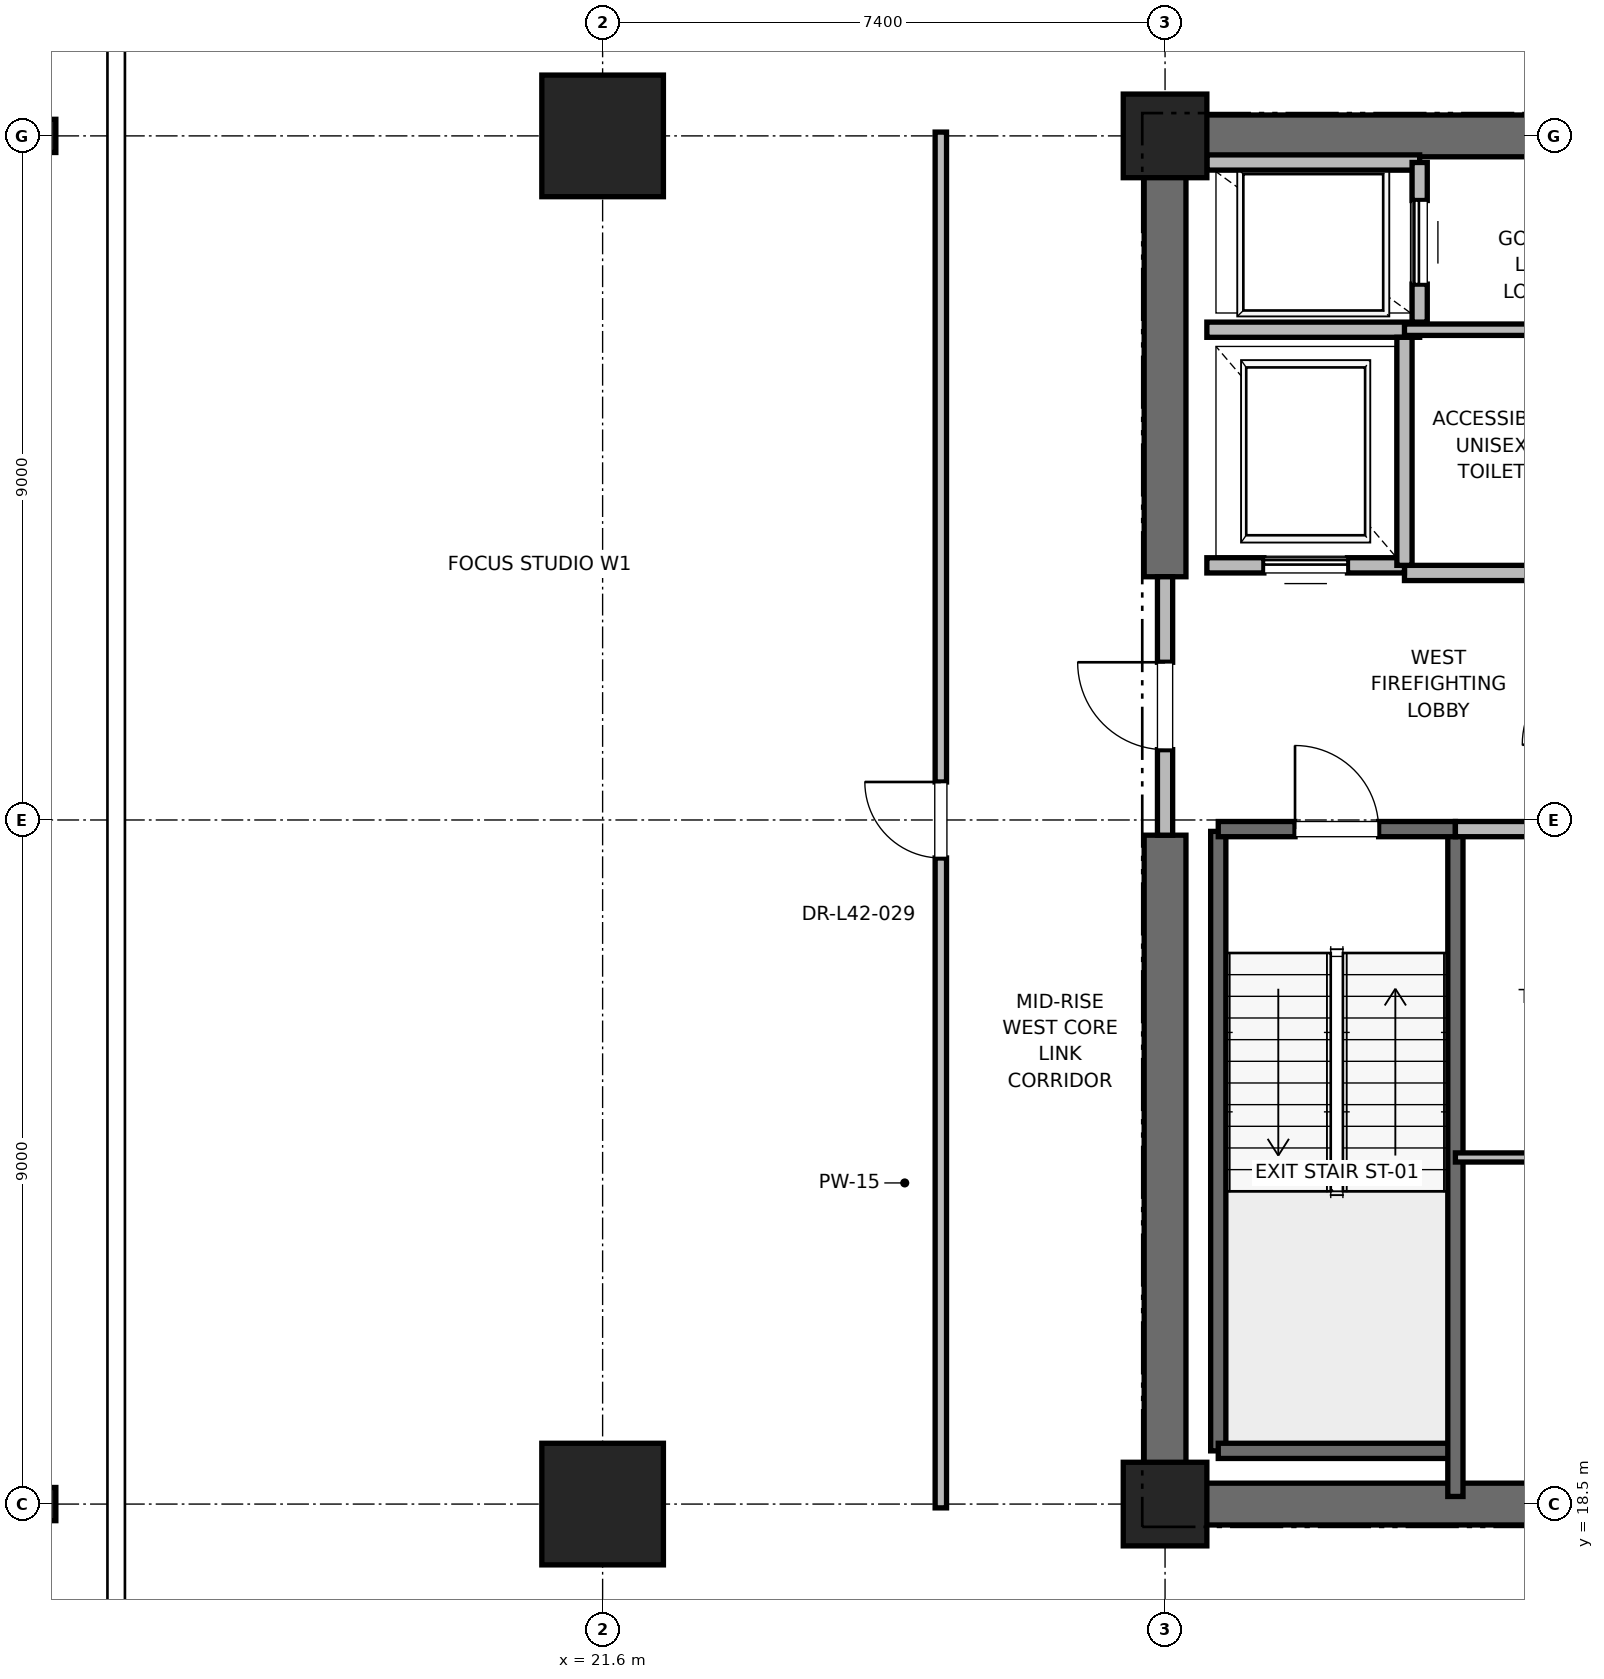
"""IFC4 building model, lengths in metres.
Left out: names, types, materials, properties, quantities, classifications, styles, units other than length and angle.
Written with IfcOpenShell. Run it as: python <this file> out.ifc"""

import sys

from ifc_helpers import new_model, si_unit, direction, frame, frame_2d, origin, origin_2d, place, context, subcontext, project, spatial, rectangle, i_section, extrude, element, fill, save


model = new_model("IFC4")
c1 = context("Model", 3, precision=1e-05, world=origin(), true_north=direction((0.0, 1.0)))
c2 = subcontext(c1, "Body", "Model", "MODEL_VIEW")
j1 = project(units=[si_unit("LENGTHUNIT", "METRE"), si_unit("PLANEANGLEUNIT", "RADIAN")], contexts=[c1])
p1 = place(None, origin())
s1 = spatial("IfcSite", under=j1, at=p1, CompositionType="ELEMENT")
p2 = place(p1, origin())
s2 = spatial("IfcBuilding", under=s1, at=p2, CompositionType="ELEMENT")
p3 = place(p2, frame((0.0, 0.0, 180.4)))
s3 = spatial("IfcBuildingStorey", under=s2, at=p3, CompositionType="ELEMENT", Elevation=180.4)
for number, where, z_axis, x_axis in (
    (1, (21.6, 18.5, 0.0), (0.0, 0.0, 1.0), (1.0, 0.0, 0.0)),
    (2, (21.6, 36.5, 0.0), (0.0, 0.0, 1.0), (1.0, 0.0, 0.0)),
):
    element("IfcColumn", number, at=place(p3, frame(where, z_axis=z_axis, x_axis=x_axis)), inside=s3, PredefinedType="COLUMN", context=c2, shape_type="SweptSolid", body=[
        extrude(rectangle(XDim=1.6, YDim=1.6, at=origin_2d()), origin(), (0.0, 0.0, 1.0), 4.0),
    ])
for number, where, z_axis, x_axis in (
    (3, (14.2, 18.5, 0.0), (0.0, 0.0, 1.0), (1.0, 0.0, 0.0)),
    (4, (14.2, 36.5, 0.0), (0.0, 0.0, 1.0), (1.0, 0.0, 0.0)),
):
    element("IfcColumn", number, at=place(p3, frame(where, z_axis=z_axis, x_axis=x_axis)), inside=s3, PredefinedType="COLUMN", context=c2, shape_type="SweptSolid", body=[
        extrude(i_section(OverallWidth=0.412, OverallDepth=0.437, WebThickness=0.036, FlangeThickness=0.058, FilletRadius=0.015, at=origin_2d()), origin(), (0.0, 0.0, 1.0), 4.0),
    ])
for number, where, z_axis, x_axis in (
    (5, (29.0, 18.5, 0.0), (0.0, 0.0, 1.0), (1.0, 0.0, 0.0)),
    (6, (29.0, 36.5, 0.0), (0.0, 0.0, 1.0), (1.0, 0.0, 0.0)),
):
    element("IfcColumn", number, at=place(p3, frame(where, z_axis=z_axis, x_axis=x_axis)), inside=s3, PredefinedType="PILASTER", context=c2, shape_type="SweptSolid", body=[
        extrude(rectangle(XDim=1.1, YDim=1.1, at=origin_2d()), origin(), (0.0, 0.0, 1.0), 4.0),
    ])
p4 = place(p3, frame((29.0, 18.5, 0.0), z_axis=(0.0, 0.0, 1.0), x_axis=(1.0, 0.0, 0.0)))
e7 = element("IfcWall", 7, at=p4, inside=s3, PredefinedType="SHEAR", context=c2, shape_type="SweptSolid", body=[
    extrude(rectangle(XDim=9.2, YDim=0.55, at=frame_2d((4.6, 0.0))), origin(), (0.0, 0.0, 1.0), 3.7),
])
p5 = place(p3, frame((29.0, 36.5, 0.0), z_axis=(0.0, 0.0, 1.0), x_axis=(1.0, 0.0, 0.0)))
e8 = element("IfcWall", 8, at=p5, inside=s3, PredefinedType="SHEAR", context=c2, shape_type="SweptSolid", body=[
    extrude(rectangle(XDim=5.8, YDim=0.55, at=frame_2d((2.9, 0.0))), origin(), (0.0, 0.0, 1.0), 3.7),
])
p6 = place(p3, frame((29.0, 18.5, 0.0), z_axis=(0.0, 0.0, 1.0), x_axis=(0.0, 1.0, 0.0)))
e9 = element("IfcWall", 9, at=p6, inside=s3, PredefinedType="SHEAR", context=c2, shape_type="SweptSolid", body=[
    extrude(rectangle(XDim=8.8, YDim=0.55, at=frame_2d((4.4, 0.0))), origin(), (0.0, 0.0, 1.0), 3.7),
])
p7 = place(p3, frame((29.0, 30.7, 0.0), z_axis=(0.0, 0.0, 1.0), x_axis=(0.0, 1.0, 0.0)))
e10 = element("IfcWall", 10, at=p7, inside=s3, PredefinedType="SHEAR", context=c2, shape_type="SweptSolid", body=[
    extrude(rectangle(XDim=5.8, YDim=0.55, at=frame_2d((2.9, 0.0))), origin(), (0.0, 0.0, 1.0), 3.7),
])
p8 = place(p3, frame((29.7, 19.2, 0.0), z_axis=(0.0, 0.0, 1.0), x_axis=(0.0, 1.0, 0.0)))
e11 = element("IfcWall", 11, at=p8, inside=s3, PredefinedType="SOLIDWALL", context=c2, shape_type="SweptSolid", body=[
    extrude(rectangle(XDim=8.15, YDim=0.2, at=frame_2d((4.075, 0.0))), origin(), (0.0, 0.0, 1.0), 3.7),
])
p9 = place(p3, frame((29.7, 19.2, 0.0), z_axis=(0.0, 0.0, 1.0), x_axis=(1.0, 0.0, 0.0)))
e12 = element("IfcWall", 12, at=p9, inside=s3, PredefinedType="SOLIDWALL", context=c2, shape_type="SweptSolid", body=[
    extrude(rectangle(XDim=3.12, YDim=0.2, at=frame_2d((1.56, 0.0))), origin(), (0.0, 0.0, 1.0), 3.7),
])
p10 = place(p3, frame((32.82, 18.6, 0.0), z_axis=(0.0, 0.0, 1.0), x_axis=(0.0, 1.0, 0.0)))
e13 = element("IfcWall", 13, at=p10, inside=s3, PredefinedType="SOLIDWALL", context=c2, shape_type="SweptSolid", body=[
    extrude(rectangle(XDim=8.78, YDim=0.2, at=frame_2d((4.39, 0.0))), origin(), (0.0, 0.0, 1.0), 3.7),
])
p11 = place(p3, frame((29.7, 27.38, 0.0), z_axis=(0.0, 0.0, 1.0), x_axis=(1.0, 0.0, 0.0)))
e14 = element("IfcWall", 14, at=p11, inside=s3, PredefinedType="SOLIDWALL", context=c2, shape_type="SweptSolid", body=[
    extrude(rectangle(XDim=3.12, YDim=0.2, at=frame_2d((1.56, 0.0))), origin(), (0.0, 0.0, 1.0), 3.7),
])
p12 = place(p11, frame((1.01, 0.0, 0.0)))
e15 = element("IfcOpeningElement", 15, at=p12, cuts=e14, PredefinedType="OPENING", context=c2, shape_type="SweptSolid", body=[
    extrude(rectangle(XDim=1.1, YDim=2.15, at=frame_2d((0.55, 1.075))), frame((0.0, 0.1, 0.0), z_axis=(0.0, -1.0, 0.0), x_axis=(1.0, 0.0, 0.0)), (0.0, 0.0, 1.0), 0.2),
])
p13 = place(p3, frame((29.0, 27.3, 0.0), z_axis=(0.0, 0.0, 1.0), x_axis=(0.0, 1.0, 0.0)))
e16 = element("IfcWall", 16, at=p13, inside=s3, PredefinedType="PARTITIONING", context=c2, shape_type="SweptSolid", body=[
    extrude(rectangle(XDim=3.4, YDim=0.2, at=frame_2d((1.7, 0.0))), origin(), (0.0, 0.0, 1.0), 2.68),
])
p14 = place(p13, frame((1.125, 0.0, 0.0)))
e17 = element("IfcOpeningElement", 17, at=p14, cuts=e16, PredefinedType="OPENING", context=c2, shape_type="SweptSolid", body=[
    extrude(rectangle(XDim=1.15, YDim=2.2, at=frame_2d((0.575, 1.1))), frame((0.0, 0.1, 0.0), z_axis=(0.0, -1.0, 0.0), x_axis=(1.0, 0.0, 0.0)), (0.0, 0.0, 1.0), 0.2),
])
p15 = place(p3, frame((32.82, 27.38, 0.0), z_axis=(0.0, 0.0, 1.0), x_axis=(1.0, 0.0, 0.0)))
e18 = element("IfcWall", 18, at=p15, inside=s3, PredefinedType="PARTITIONING", context=c2, shape_type="SweptSolid", body=[
    extrude(rectangle(XDim=5.62, YDim=0.2, at=frame_2d((2.81, 0.0))), origin(), (0.0, 0.0, 1.0), 3.7),
])
p16 = place(p3, frame((32.15, 30.75, 0.0), z_axis=(0.0, 0.0, 1.0), x_axis=(1.0, 0.0, 0.0)))
e19 = element("IfcWall", 19, at=p16, inside=s3, PredefinedType="PARTITIONING", context=c2, shape_type="SweptSolid", body=[
    extrude(rectangle(XDim=3.13, YDim=0.2, at=frame_2d((1.565, 0.0))), origin(), (0.0, 0.0, 1.0), 3.7),
])
p17 = place(p3, frame((29.55, 30.85, 0.0), z_axis=(0.0, 0.0, 1.0), x_axis=(1.0, 0.0, 0.0)))
e20 = element("IfcWall", 20, at=p17, inside=s3, PredefinedType="SOLIDWALL", context=c2, shape_type="SweptSolid", body=[
    extrude(rectangle(XDim=2.6, YDim=0.2, at=frame_2d((1.3, 0.0))), origin(), (0.0, 0.0, 1.0), 2.68),
])
p18 = place(p17, frame((0.75, 0.0, 0.0)))
e21 = element("IfcOpeningElement", 21, at=p18, cuts=e20, PredefinedType="OPENING", context=c2, shape_type="SweptSolid", body=[
    extrude(rectangle(XDim=1.1, YDim=2.2, at=frame_2d((0.55, 1.1))), frame((0.0, 0.1, 0.0), z_axis=(0.0, -1.0, 0.0), x_axis=(1.0, 0.0, 0.0)), (0.0, 0.0, 1.0), 0.2),
])
p19 = place(p3, frame((29.55, 33.95, 0.0), z_axis=(0.0, 0.0, 1.0), x_axis=(1.0, 0.0, 0.0)))
e22 = element("IfcWall", 22, at=p19, inside=s3, PredefinedType="SOLIDWALL", context=c2, shape_type="SweptSolid", body=[
    extrude(rectangle(XDim=2.8, YDim=0.2, at=frame_2d((1.4, 0.0))), origin(), (0.0, 0.0, 1.0), 3.7),
])
p20 = place(p3, frame((32.15, 30.85, 0.0), z_axis=(0.0, 0.0, 1.0), x_axis=(0.0, 1.0, 0.0)))
e23 = element("IfcWall", 23, at=p20, inside=s3, PredefinedType="SOLIDWALL", context=c2, shape_type="SweptSolid", body=[
    extrude(rectangle(XDim=3.0, YDim=0.2, at=frame_2d((1.5, 0.0))), origin(), (0.0, 0.0, 1.0), 3.7),
])
p21 = place(p3, frame((32.35, 36.15, 0.0), z_axis=(0.0, 0.0, 1.0), x_axis=(-1.0, 0.0, 0.0)))
e24 = element("IfcWall", 24, at=p21, inside=s3, PredefinedType="SOLIDWALL", context=c2, shape_type="SweptSolid", body=[
    extrude(rectangle(XDim=2.8, YDim=0.2, at=frame_2d((1.4, 0.0))), origin(), (0.0, 0.0, 1.0), 2.91),
])
p22 = place(p3, frame((32.35, 34.05, 0.0), z_axis=(0.0, 0.0, 1.0), x_axis=(0.0, 1.0, 0.0)))
e25 = element("IfcWall", 25, at=p22, inside=s3, PredefinedType="SOLIDWALL", context=c2, shape_type="SweptSolid", body=[
    extrude(rectangle(XDim=2.1, YDim=0.2, at=frame_2d((1.05, 0.0))), origin(), (0.0, 0.0, 1.0), 3.7),
])
p23 = place(p22, frame((0.5, 0.0, 0.0)))
e26 = element("IfcOpeningElement", 26, at=p23, cuts=e25, PredefinedType="OPENING", context=c2, shape_type="SweptSolid", body=[
    extrude(rectangle(XDim=1.1, YDim=2.2, at=frame_2d((0.55, 1.1))), frame((0.0, 0.1, 0.0), z_axis=(0.0, -1.0, 0.0), x_axis=(1.0, 0.0, 0.0)), (0.0, 0.0, 1.0), 0.2),
])
p24 = place(p3, frame((32.15, 33.95, 0.0), z_axis=(0.0, 0.0, 1.0), x_axis=(1.0, 0.0, 0.0)))
e27 = element("IfcWall", 27, at=p24, inside=s3, PredefinedType="PARTITIONING", context=c2, shape_type="SweptSolid", body=[
    extrude(rectangle(XDim=3.13, YDim=0.15, at=frame_2d((1.565, 0.0))), origin(), (0.0, 0.0, 1.0), 2.85),
])
p25 = place(p3, frame((32.82, 23.06, 0.0), z_axis=(0.0, 0.0, 1.0), x_axis=(1.0, 0.0, 0.0)))
e28 = element("IfcWall", 28, at=p25, inside=s3, PredefinedType="PARTITIONING", context=c2, shape_type="SweptSolid", body=[
    extrude(rectangle(XDim=5.23, YDim=0.12, at=frame_2d((2.615, 0.0))), origin(), (0.0, 0.0, 1.0), 2.85),
])
p26 = place(p3, frame((26.05, 18.45, 0.0), z_axis=(0.0, 0.0, 1.0), x_axis=(0.0, 1.0, 0.0)))
e29 = element("IfcWall", 29, at=p26, inside=s3, PredefinedType="PARTITIONING", context=c2, shape_type="SweptSolid", body=[
    extrude(rectangle(XDim=18.1, YDim=0.15, at=frame_2d((9.05, 0.0))), origin(), (0.0, 0.0, 1.0), 2.85),
])
p27 = place(p26, frame((8.55, 0.0, 0.0)))
e30 = element("IfcOpeningElement", 30, at=p27, cuts=e29, PredefinedType="OPENING", context=c2, shape_type="SweptSolid", body=[
    extrude(rectangle(XDim=1.0, YDim=2.15, at=frame_2d((0.5, 1.075))), frame((0.0, 0.075, 0.0), z_axis=(0.0, -1.0, 0.0), x_axis=(1.0, 0.0, 0.0)), (0.0, 0.0, 1.0), 0.15),
])
p28 = place(p12, origin())
e31 = element("IfcDoor", 31, at=p28, inside=s3, OperationType="SINGLE_SWING_LEFT", PredefinedType="DOOR", context=c2, shape_type="SweptSolid", body=[
    extrude(rectangle(XDim=1.1, YDim=2.15, at=frame_2d((0.55, 1.075))), frame((0.0, 0.025, 0.0), z_axis=(0.0, -1.0, 0.0), x_axis=(1.0, 0.0, 0.0)), (0.0, 0.0, 1.0), 0.05),
])
fill(e15, e31)
p29 = place(p14, origin())
e32 = element("IfcDoor", 32, at=p29, inside=s3, OperationType="SINGLE_SWING_RIGHT", PredefinedType="DOOR", context=c2, shape_type="SweptSolid", body=[
    extrude(rectangle(XDim=1.15, YDim=2.2, at=frame_2d((0.575, 1.1))), frame((0.0, 0.025, 0.0), z_axis=(0.0, -1.0, 0.0), x_axis=(1.0, 0.0, 0.0)), (0.0, 0.0, 1.0), 0.05),
])
fill(e17, e32)
p30 = place(p18, origin())
e33 = element("IfcDoor", 33, at=p30, inside=s3, OperationType="SLIDING_TO_RIGHT", PredefinedType="DOOR", context=c2, shape_type="SweptSolid", body=[
    extrude(rectangle(XDim=1.1, YDim=2.2, at=frame_2d((0.55, 1.1))), frame((0.0, 0.025, 0.0), z_axis=(0.0, -1.0, 0.0), x_axis=(1.0, 0.0, 0.0)), (0.0, 0.0, 1.0), 0.05),
])
fill(e21, e33)
p31 = place(p23, origin())
e34 = element("IfcDoor", 34, at=p31, inside=s3, OperationType="SLIDING_TO_RIGHT", PredefinedType="DOOR", context=c2, shape_type="SweptSolid", body=[
    extrude(rectangle(XDim=1.1, YDim=2.2, at=frame_2d((0.55, 1.1))), frame((0.0, 0.025, 0.0), z_axis=(0.0, -1.0, 0.0), x_axis=(1.0, 0.0, 0.0)), (0.0, 0.0, 1.0), 0.05),
])
fill(e26, e34)
p32 = place(p27, origin())
e35 = element("IfcDoor", 35, at=p32, inside=s3, OperationType="SINGLE_SWING_RIGHT", PredefinedType="DOOR", context=c2, shape_type="SweptSolid", body=[
    extrude(rectangle(XDim=1.0, YDim=2.15, at=frame_2d((0.5, 1.075))), frame((0.0, 0.025, 0.0), z_axis=(0.0, -1.0, 0.0), x_axis=(1.0, 0.0, 0.0)), (0.0, 0.0, 1.0), 0.05),
])
fill(e30, e35)
save(model, sys.argv[1])
